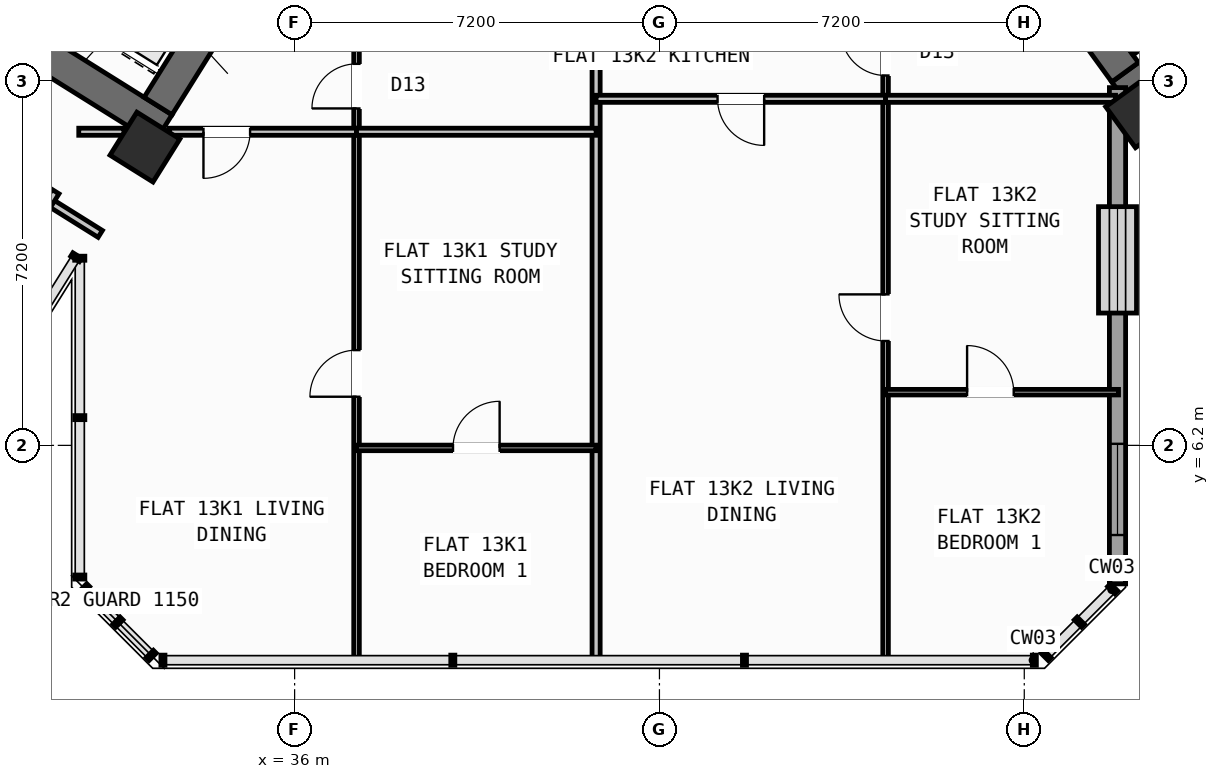
"""IFC4 building model, lengths in metres.
Left out: names, types, materials, properties, quantities, classifications, styles, units other than length and angle.
Written with IfcOpenShell. Run it as: python <this file> out.ifc"""

import sys

from ifc_helpers import new_model, si_unit, direction, frame, frame_2d, origin, origin_2d, place, context, subcontext, project, spatial, rectangle, hollow_rectangle, extrude, source, transform, mapped, element, fill, save


model = new_model("IFC4")
c1 = context("Model", 3, precision=1e-05, world=origin(), true_north=direction((0.0, 1.0)))
c2 = subcontext(c1, "Body", "Model", "MODEL_VIEW")
j1 = project(units=[si_unit("LENGTHUNIT", "METRE"), si_unit("PLANEANGLEUNIT", "RADIAN")], contexts=[c1])
p1 = place(None, origin())
s1 = spatial("IfcSite", under=j1, at=p1, CompositionType="ELEMENT")
p2 = place(p1, origin())
s2 = spatial("IfcBuilding", under=s1, at=p2, CompositionType="ELEMENT")
p3 = place(p2, frame((0.0, 0.0, 52.8)))
s3 = spatial("IfcBuildingStorey", under=s2, at=p3, CompositionType="ELEMENT", Elevation=52.8)
p4 = place(p3, frame((33.409, 12.45, 0.0), z_axis=(0.0, 0.0, 1.0), x_axis=(-0.848051132073, 0.529914405721, 0.0)))
e1 = element("IfcWall", 1, at=p4, inside=s3, PredefinedType="SHEAR", context=c2, shape_type="SweptSolid", body=[
    extrude(rectangle(XDim=13.24, YDim=0.65, at=frame_2d((6.62, 0.0))), origin(), (0.0, 0.0, 1.0), 3.35),
])
p5 = place(p3, frame((36.683, 18.304, 0.0), z_axis=(0.0, 0.0, 1.0), x_axis=(-0.529899109053, -0.848060690178, 0.0)))
e2 = element("IfcWall", 2, at=p5, inside=s3, PredefinedType="SHEAR", context=c2, shape_type="SweptSolid", body=[
    extrude(rectangle(XDim=6.375, YDim=0.65, at=frame_2d((3.188, 0.0))), origin(), (0.0, 0.0, 1.0), 3.35),
])
p6 = place(p3, frame((52.318, 13.11, 0.0), z_axis=(0.0, 0.0, 1.0), x_axis=(0.809019445368, 0.587781878776, 0.0)))
e3 = element("IfcWall", 3, at=p6, inside=s3, PredefinedType="SHEAR", context=c2, shape_type="SweptSolid", body=[
    extrude(rectangle(XDim=12.44, YDim=0.65, at=frame_2d((6.22, 0.0))), origin(), (0.0, 0.0, 1.0), 3.35),
])
p7 = place(p3, frame((52.39, 13.564, 0.0), z_axis=(0.0, 0.0, 1.0), x_axis=(-0.58779688989, 0.809008539037, 0.0)))
e4 = element("IfcWall", 4, at=p7, inside=s3, PredefinedType="SHEAR", context=c2, shape_type="SweptSolid", body=[
    extrude(rectangle(XDim=3.525, YDim=0.65, at=frame_2d((1.763, 0.0))), origin(), (0.0, 0.0, 1.0), 3.35),
])
m1 = source(origin(), c2, "Body", "SweptSolid", [
    extrude(hollow_rectangle(XDim=1.0, YDim=1.0, WallThickness=0.04, at=origin_2d()), origin(), (0.0, 0.0, 1.0), 3.6),
])
for number, where, z_axis, x_axis in (
    (5, (33.046, 12.087, 0.0), (0.0, 0.0, 1.0), (-0.848, 0.53, 0.0)),
    (6, (52.705, 12.773, 0.0), (0.0, 0.0, 1.0), (0.809, 0.588, 0.0)),
):
    element("IfcColumn", number, at=place(p3, frame(where, z_axis=z_axis, x_axis=x_axis)), inside=s3, PredefinedType="COLUMN", context=c2, shape_type="MappedRepresentation", body=[
        mapped(m1, transform((0.0, 0.0, 0.0), scale=1.0)),
    ])
p8 = place(p3, frame((56.581, 7.439, 0.0), z_axis=(0.0, 0.0, 1.0), x_axis=(-0.587785875463, 0.809016541614, 0.0)))
e7 = element("IfcWall", 7, at=p8, inside=s3, PredefinedType="STANDARD", context=c2, shape_type="SweptSolid", body=[
    extrude(rectangle(XDim=6.774, YDim=0.32, at=frame_2d((3.387, 0.0))), origin(), (0.0, 0.0, 1.0), 2.725),
])
p9 = place(p8, frame((1.556, 0.0, 0.8)))
e8 = element("IfcOpeningElement", 8, at=p9, cuts=e7, PredefinedType="OPENING", context=c2, shape_type="SweptSolid", body=[
    extrude(rectangle(XDim=2.1, YDim=1.55, at=frame_2d((1.05, 0.775))), frame((0.0, 0.17, 0.0), z_axis=(0.0, -1.0, 0.0), x_axis=(1.0, 0.0, 0.0)), (0.0, 0.0, 1.0), 0.34),
])
p10 = place(p3, frame((52.24, 13.261, 0.0), z_axis=(0.0, 0.0, 1.0), x_axis=(0.0, -1.0, 0.0)))
e9 = element("IfcWall", 9, at=p10, inside=s3, PredefinedType="STANDARD", context=c2, shape_type="SweptSolid", body=[
    extrude(rectangle(XDim=9.795, YDim=0.32, at=frame_2d((4.897, 0.0))), origin(), (0.0, 0.0, 1.0), 3.35),
])
p11 = place(p10, frame((2.349, 0.0, 0.8)))
e10 = element("IfcOpeningElement", 10, at=p11, cuts=e9, PredefinedType="OPENING", context=c2, shape_type="SweptSolid", body=[
    extrude(rectangle(XDim=2.1, YDim=1.55, at=frame_2d((1.05, 0.775))), frame((0.0, 0.17, 0.0), z_axis=(0.0, -1.0, 0.0), x_axis=(1.0, 0.0, 0.0)), (0.0, 0.0, 1.0), 0.34),
])
p12 = place(p10, frame((7.03, 0.0, 0.85)))
e11 = element("IfcOpeningElement", 11, at=p12, cuts=e9, PredefinedType="OPENING", context=c2, shape_type="SweptSolid", body=[
    extrude(rectangle(XDim=1.8, YDim=1.5, at=frame_2d((0.9, 0.75))), frame((0.0, 0.17, 0.0), z_axis=(0.0, -1.0, 0.0), x_axis=(1.0, 0.0, 0.0)), (0.0, 0.0, 1.0), 0.34),
])
p13 = place(p3, frame((52.472, 14.013, 0.0), z_axis=(0.0, 0.0, 1.0), x_axis=(0.809028366311, 0.587769599847, 0.0)))
e12 = element("IfcWall", 12, at=p13, inside=s3, PredefinedType="SHEAR", context=c2, shape_type="SweptSolid", body=[
    extrude(rectangle(XDim=7.33, YDim=0.26, at=frame_2d((3.665, 0.0))), origin(), (0.0, 0.0, 1.0), 3.35),
])
p14 = place(p3, frame((32.164, 10.374, 0.0), z_axis=(0.0, 0.0, 1.0), x_axis=(-0.848044107957, 0.529925646633, 0.0)))
e13 = element("IfcWall", 13, at=p14, inside=s3, PredefinedType="PARTITIONING", context=c2, shape_type="SweptSolid", body=[
    extrude(rectangle(XDim=15.57, YDim=0.16, at=frame_2d((7.785, 0.0))), origin(), (0.0, 0.0, 1.0), 3.34),
])
p15 = place(p14, frame((10.83, 0.0, 0.0)))
e14 = element("IfcOpeningElement", 14, at=p15, cuts=e13, PredefinedType="OPENING", context=c2, shape_type="SweptSolid", body=[
    extrude(rectangle(XDim=1.0, YDim=2.1, at=frame_2d((0.5, 1.05))), frame((0.0, 0.09, 0.0), z_axis=(0.0, -1.0, 0.0), x_axis=(1.0, 0.0, 0.0)), (0.0, 0.0, 1.0), 0.18),
])
p16 = place(p3, frame((31.282, 11.208, 0.0), z_axis=(0.0, 0.0, 1.0), x_axis=(-0.529938869374, -0.84803584519, 0.0)))
e15 = element("IfcWall", 15, at=p16, inside=s3, PredefinedType="PARTITIONING", context=c2, shape_type="SweptSolid", body=[
    extrude(rectangle(XDim=5.48, YDim=0.16, at=frame_2d((2.74, 0.0))), origin(), (0.0, 0.0, 1.0), 3.34),
])
p17 = place(p3, frame((41.95, 1.96, 0.0), z_axis=(0.0, 0.0, 1.0), x_axis=(0.0, 1.0, 0.0)))
e16 = element("IfcWall", 16, at=p17, inside=s3, PredefinedType="PARTITIONING", context=c2, shape_type="SweptSolid", body=[
    extrude(rectangle(XDim=13.46, YDim=0.16, at=frame_2d((6.73, 0.0))), origin(), (0.0, 0.0, 1.0), 3.34),
])
p18 = place(p3, frame((37.222, 1.96, 0.0), z_axis=(0.0, 0.0, 1.0), x_axis=(0.0, 1.0, 0.0)))
e17 = element("IfcWall", 17, at=p18, inside=s3, PredefinedType="PARTITIONING", context=c2, shape_type="SweptSolid", body=[
    extrude(rectangle(XDim=13.46, YDim=0.11, at=frame_2d((6.73, 0.0))), origin(), (0.0, 0.0, 1.0), 3.34),
])
p19 = place(p18, frame((5.2, 0.0, 0.0)))
e18 = element("IfcOpeningElement", 18, at=p19, cuts=e17, PredefinedType="OPENING", context=c2, shape_type="SweptSolid", body=[
    extrude(rectangle(XDim=0.92, YDim=2.08, at=frame_2d((0.46, 1.04))), frame((0.0, 0.065, 0.0), z_axis=(0.0, -1.0, 0.0), x_axis=(1.0, 0.0, 0.0)), (0.0, 0.0, 1.0), 0.13),
])
p20 = place(p18, frame((10.89, 0.0, 0.0)))
e19 = element("IfcOpeningElement", 19, at=p20, cuts=e17, PredefinedType="OPENING", context=c2, shape_type="SweptSolid", body=[
    extrude(rectangle(XDim=0.88, YDim=2.08, at=frame_2d((0.44, 1.04))), frame((0.0, 0.065, 0.0), z_axis=(0.0, -1.0, 0.0), x_axis=(1.0, 0.0, 0.0)), (0.0, 0.0, 1.0), 0.13),
])
p21 = place(p3, frame((31.74, 12.39, 0.0), z_axis=(0.0, 0.0, 1.0), x_axis=(1.0, 0.0, 0.0)))
e20 = element("IfcWall", 20, at=p21, inside=s3, PredefinedType="PLUMBINGWALL", context=c2, shape_type="SweptSolid", body=[
    extrude(rectangle(XDim=0.892, YDim=0.14, at=frame_2d((0.446, 0.0))), origin(), (0.0, 0.0, 1.0), 3.34),
])
p22 = place(p3, frame((33.527, 12.39, 0.0), z_axis=(0.0, 0.0, 1.0), x_axis=(1.0, 0.0, 0.0)))
e21 = element("IfcWall", 21, at=p22, inside=s3, PredefinedType="PLUMBINGWALL", context=c2, shape_type="SweptSolid", body=[
    extrude(rectangle(XDim=3.695, YDim=0.14, at=frame_2d((1.847, 0.0))), origin(), (0.0, 0.0, 1.0), 2.525),
])
p23 = place(p22, frame((0.674, 0.0, 0.0)))
e22 = element("IfcOpeningElement", 22, at=p23, cuts=e21, PredefinedType="OPENING", context=c2, shape_type="SweptSolid", body=[
    extrude(rectangle(XDim=0.92, YDim=2.08, at=frame_2d((0.46, 1.04))), frame((0.0, 0.08, 0.0), z_axis=(0.0, -1.0, 0.0), x_axis=(1.0, 0.0, 0.0)), (0.0, 0.0, 1.0), 0.16),
])
p24 = place(p3, frame((37.222, 12.39, 0.0), z_axis=(0.0, 0.0, 1.0), x_axis=(1.0, 0.0, 0.0)))
e23 = element("IfcWall", 23, at=p24, inside=s3, PredefinedType="PLUMBINGWALL", context=c2, shape_type="SweptSolid", body=[
    extrude(rectangle(XDim=4.728, YDim=0.14, at=frame_2d((2.364, 0.0))), origin(), (0.0, 0.0, 1.0), 2.525),
])
p25 = place(p3, frame((37.222, 6.15, 0.0), z_axis=(0.0, 0.0, 1.0), x_axis=(1.0, 0.0, 0.0)))
e24 = element("IfcWall", 24, at=p25, inside=s3, PredefinedType="PARTITIONING", context=c2, shape_type="SweptSolid", body=[
    extrude(rectangle(XDim=4.728, YDim=0.11, at=frame_2d((2.364, 0.0))), origin(), (0.0, 0.0, 1.0), 3.34),
])
p26 = place(p25, frame((1.904, 0.0, 0.0)))
e25 = element("IfcOpeningElement", 25, at=p26, cuts=e24, PredefinedType="OPENING", context=c2, shape_type="SweptSolid", body=[
    extrude(rectangle(XDim=0.92, YDim=2.08, at=frame_2d((0.46, 1.04))), frame((0.0, 0.065, 0.0), z_axis=(0.0, -1.0, 0.0), x_axis=(1.0, 0.0, 0.0)), (0.0, 0.0, 1.0), 0.13),
])
p27 = place(p3, frame((47.663, 1.96, 0.0), z_axis=(0.0, 0.0, 1.0), x_axis=(0.0, 1.0, 0.0)))
e26 = element("IfcWall", 26, at=p27, inside=s3, PredefinedType="PARTITIONING", context=c2, shape_type="SweptSolid", body=[
    extrude(rectangle(XDim=13.46, YDim=0.11, at=frame_2d((6.73, 0.0))), origin(), (0.0, 0.0, 1.0), 3.34),
])
p28 = place(p27, frame((6.3, 0.0, 0.0)))
e27 = element("IfcOpeningElement", 27, at=p28, cuts=e26, PredefinedType="OPENING", context=c2, shape_type="SweptSolid", body=[
    extrude(rectangle(XDim=0.92, YDim=2.08, at=frame_2d((0.46, 1.04))), frame((0.0, 0.065, 0.0), z_axis=(0.0, -1.0, 0.0), x_axis=(1.0, 0.0, 0.0)), (0.0, 0.0, 1.0), 0.13),
])
p29 = place(p27, frame((11.54, 0.0, 0.0)))
e28 = element("IfcOpeningElement", 28, at=p29, cuts=e26, PredefinedType="OPENING", context=c2, shape_type="SweptSolid", body=[
    extrude(rectangle(XDim=0.88, YDim=2.08, at=frame_2d((0.44, 1.04))), frame((0.0, 0.065, 0.0), z_axis=(0.0, -1.0, 0.0), x_axis=(1.0, 0.0, 0.0)), (0.0, 0.0, 1.0), 0.13),
])
p30 = place(p3, frame((41.95, 13.04, 0.0), z_axis=(0.0, 0.0, 1.0), x_axis=(1.0, 0.0, 0.0)))
e29 = element("IfcWall", 29, at=p30, inside=s3, PredefinedType="PLUMBINGWALL", context=c2, shape_type="SweptSolid", body=[
    extrude(rectangle(XDim=5.713, YDim=0.14, at=frame_2d((2.856, 0.0))), origin(), (0.0, 0.0, 1.0), 3.34),
])
p31 = place(p30, frame((2.396, 0.0, 0.0)))
e30 = element("IfcOpeningElement", 30, at=p31, cuts=e29, PredefinedType="OPENING", context=c2, shape_type="SweptSolid", body=[
    extrude(rectangle(XDim=0.92, YDim=2.08, at=frame_2d((0.46, 1.04))), frame((0.0, 0.08, 0.0), z_axis=(0.0, -1.0, 0.0), x_axis=(1.0, 0.0, 0.0)), (0.0, 0.0, 1.0), 0.16),
])
p32 = place(p3, frame((47.663, 13.04, 0.0), z_axis=(0.0, 0.0, 1.0), x_axis=(1.0, 0.0, 0.0)))
e31 = element("IfcWall", 31, at=p32, inside=s3, PredefinedType="PLUMBINGWALL", context=c2, shape_type="SweptSolid", body=[
    extrude(rectangle(XDim=4.538, YDim=0.14, at=frame_2d((2.269, 0.0))), origin(), (0.0, 0.0, 1.0), 2.525),
])
p33 = place(p3, frame((47.663, 7.25, 0.0), z_axis=(0.0, 0.0, 1.0), x_axis=(1.0, 0.0, 0.0)))
e32 = element("IfcWall", 32, at=p33, inside=s3, PredefinedType="PARTITIONING", context=c2, shape_type="SweptSolid", body=[
    extrude(rectangle(XDim=4.597, YDim=0.11, at=frame_2d((2.298, 0.0))), origin(), (0.0, 0.0, 1.0), 3.34),
])
p34 = place(p33, frame((1.608, 0.0, 0.0)))
e33 = element("IfcOpeningElement", 33, at=p34, cuts=e32, PredefinedType="OPENING", context=c2, shape_type="SweptSolid", body=[
    extrude(rectangle(XDim=0.92, YDim=2.08, at=frame_2d((0.46, 1.04))), frame((0.0, 0.065, 0.0), z_axis=(0.0, -1.0, 0.0), x_axis=(1.0, 0.0, 0.0)), (0.0, 0.0, 1.0), 0.13),
])
m2 = source(origin(), c2, "Body", "SweptSolid", [
    extrude(rectangle(XDim=2.1, YDim=1.55, at=frame_2d((1.05, 0.775))), frame((0.0, 0.03, 0.0), z_axis=(0.0, -1.0, 0.0), x_axis=(1.0, 0.0, 0.0)), (0.0, 0.0, 1.0), 0.06),
])
p35 = place(p11, origin())
e34 = element("IfcWindow", 34, at=p35, inside=s3, PartitioningType="SINGLE_PANEL", PredefinedType="WINDOW", context=c2, shape_type="MappedRepresentation", body=[
    mapped(m2, transform((0.0, 0.0, 0.0), scale=1.0)),
])
fill(e10, e34)
m3 = source(origin(), c2, "Body", "SweptSolid", [
    extrude(rectangle(XDim=1.8, YDim=1.5, at=frame_2d((0.9, 0.75))), frame((0.0, 0.03, 0.0), z_axis=(0.0, -1.0, 0.0), x_axis=(1.0, 0.0, 0.0)), (0.0, 0.0, 1.0), 0.06),
])
p36 = place(p12, origin())
e35 = element("IfcWindow", 35, at=p36, inside=s3, PartitioningType="SINGLE_PANEL", PredefinedType="WINDOW", context=c2, shape_type="MappedRepresentation", body=[
    mapped(m3, transform((0.0, 0.0, 0.0), scale=1.0)),
])
fill(e11, e35)
m4 = source(origin(), c2, "Body", "SweptSolid", [
    extrude(rectangle(XDim=0.92, YDim=2.08, at=frame_2d((0.46, 1.04))), frame((0.0, 0.025, 0.0), z_axis=(0.0, -1.0, 0.0), x_axis=(1.0, 0.0, 0.0)), (0.0, 0.0, 1.0), 0.05),
])
p37 = place(p19, origin())
e36 = element("IfcDoor", 36, at=p37, inside=s3, OperationType="SINGLE_SWING_LEFT", PredefinedType="DOOR", context=c2, shape_type="MappedRepresentation", body=[
    mapped(m4, transform((0.0, 0.0, 0.0), scale=1.0)),
])
fill(e18, e36)
p38 = place(p26, origin())
e37 = element("IfcDoor", 37, at=p38, inside=s3, OperationType="SINGLE_SWING_RIGHT", PredefinedType="DOOR", context=c2, shape_type="MappedRepresentation", body=[
    mapped(m4, transform((0.0, 0.0, 0.0), scale=1.0)),
])
fill(e25, e37)
p39 = place(p23, frame((0.92, 0.0, 0.0), z_axis=(0.0, 0.0, 1.0), x_axis=(-1.0, 0.0, 0.0)))
e38 = element("IfcDoor", 38, at=p39, inside=s3, OperationType="SINGLE_SWING_RIGHT", PredefinedType="DOOR", context=c2, shape_type="MappedRepresentation", body=[
    mapped(m4, transform((0.0, 0.0, 0.0), scale=1.0)),
])
fill(e22, e38)
m5 = source(origin(), c2, "Body", "SweptSolid", [
    extrude(rectangle(XDim=0.88, YDim=2.08, at=frame_2d((0.44, 1.04))), frame((0.0, 0.025, 0.0), z_axis=(0.0, -1.0, 0.0), x_axis=(1.0, 0.0, 0.0)), (0.0, 0.0, 1.0), 0.05),
])
p40 = place(p20, origin())
e39 = element("IfcDoor", 39, at=p40, inside=s3, OperationType="SINGLE_SWING_LEFT", PredefinedType="DOOR", context=c2, shape_type="MappedRepresentation", body=[
    mapped(m5, transform((0.0, 0.0, 0.0), scale=1.0)),
])
fill(e19, e39)
p41 = place(p28, origin())
e40 = element("IfcDoor", 40, at=p41, inside=s3, OperationType="SINGLE_SWING_RIGHT", PredefinedType="DOOR", context=c2, shape_type="MappedRepresentation", body=[
    mapped(m4, transform((0.0, 0.0, 0.0), scale=1.0)),
])
fill(e27, e40)
p42 = place(p34, origin())
e41 = element("IfcDoor", 41, at=p42, inside=s3, OperationType="SINGLE_SWING_LEFT", PredefinedType="DOOR", context=c2, shape_type="MappedRepresentation", body=[
    mapped(m4, transform((0.0, 0.0, 0.0), scale=1.0)),
])
fill(e33, e41)
p43 = place(p31, frame((0.92, 0.0, 0.0), z_axis=(0.0, 0.0, 1.0), x_axis=(-1.0, 0.0, 0.0)))
e42 = element("IfcDoor", 42, at=p43, inside=s3, OperationType="SINGLE_SWING_LEFT", PredefinedType="DOOR", context=c2, shape_type="MappedRepresentation", body=[
    mapped(m4, transform((0.0, 0.0, 0.0), scale=1.0)),
])
fill(e30, e42)
p44 = place(p29, origin())
e43 = element("IfcDoor", 43, at=p44, inside=s3, OperationType="SINGLE_SWING_RIGHT", PredefinedType="DOOR", context=c2, shape_type="MappedRepresentation", body=[
    mapped(m5, transform((0.0, 0.0, 0.0), scale=1.0)),
])
fill(e28, e43)
save(model, sys.argv[1])
